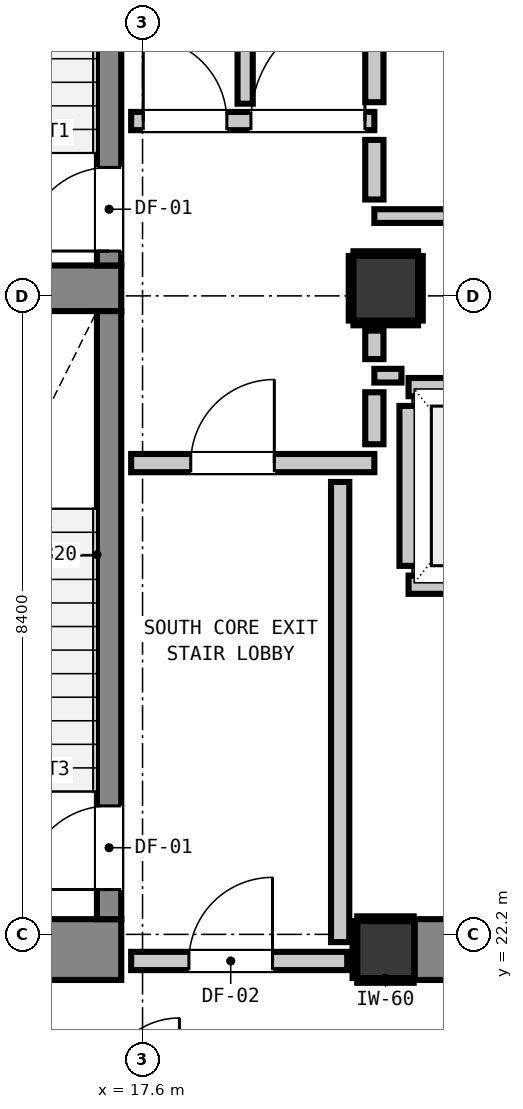
"""IFC4 building model, lengths in metres.
Left out: names, types, materials, properties, quantities, classifications, styles, units other than length and angle.
Written with IfcOpenShell. Run it as: python <this file> out.ifc"""

import sys

from ifc_helpers import new_model, si_unit, direction, frame, frame_2d, origin, origin_2d, place, context, subcontext, project, spatial, rectangle, extrude, element, fill, save


model = new_model("IFC4")
c1 = context("Model", 3, precision=1e-05, world=origin(), true_north=direction((0.0, 1.0)))
c2 = subcontext(c1, "Body", "Model", "MODEL_VIEW")
j1 = project(units=[si_unit("LENGTHUNIT", "METRE"), si_unit("PLANEANGLEUNIT", "RADIAN")], contexts=[c1])
p1 = place(None, origin())
s1 = spatial("IfcSite", under=j1, at=p1, CompositionType="ELEMENT")
p2 = place(p1, origin())
s2 = spatial("IfcBuilding", under=s1, at=p2, CompositionType="ELEMENT")
p3 = place(p2, frame((0.0, 0.0, 257.84)))
s3 = spatial("IfcBuildingStorey", under=s2, at=p3, CompositionType="ELEMENT", Elevation=257.84)
p4 = place(p3, frame((20.8, 22.0, 0.0), z_axis=(0.0, 0.0, 1.0), x_axis=(1.0, 0.0, 0.0)))
e1 = element("IfcColumn", 1, at=p4, inside=s3, PredefinedType="COLUMN", context=c2, shape_type="SweptSolid", body=[
    extrude(rectangle(XDim=0.75, YDim=0.75, at=origin_2d()), origin(), (0.0, 0.0, 1.0), 4.4),
])
p5 = place(p3, frame((13.24, 22.0, 0.0), z_axis=(0.0, 0.0, 1.0), x_axis=(1.0, 0.0, 0.0)))
e2 = element("IfcWall", 2, at=p5, inside=s3, PredefinedType="SHEAR", context=c2, shape_type="SweptSolid", body=[
    extrude(rectangle(XDim=4.08, YDim=0.8, at=frame_2d((2.04, 0.0))), origin(), (0.0, 0.0, 1.0), 4.4),
])
p6 = place(p3, frame((13.78, 30.7, 0.0), z_axis=(0.0, 0.0, 1.0), x_axis=(1.0, 0.0, 0.0)))
e3 = element("IfcWall", 3, at=p6, inside=s3, PredefinedType="SHEAR", context=c2, shape_type="SweptSolid", body=[
    extrude(rectangle(XDim=3.54, YDim=0.6, at=frame_2d((1.77, 0.0))), origin(), (0.0, 0.0, 1.0), 4.4),
])
p7 = place(p3, frame((21.18, 22.0, 0.0), z_axis=(0.0, 0.0, 1.0), x_axis=(1.0, 0.0, 0.0)))
e4 = element("IfcWall", 4, at=p7, inside=s3, PredefinedType="SHEAR", context=c2, shape_type="SweptSolid", body=[
    extrude(rectangle(XDim=7.64, YDim=0.8, at=frame_2d((3.82, 0.0))), origin(), (0.0, 0.0, 1.0), 4.4),
])
p8 = place(p3, frame((17.16, 31.0, 0.0), z_axis=(0.0, 0.0, 1.0), x_axis=(0.0, 1.0, 0.0)))
e5 = element("IfcWall", 5, at=p8, inside=s3, PredefinedType="SHEAR", context=c2, shape_type="SweptSolid", body=[
    extrude(rectangle(XDim=7.8, YDim=0.32, at=frame_2d((3.9, 0.0))), origin(), (0.0, 0.0, 1.0), 4.4),
])
p9 = place(p8, frame((0.19, 0.0, 0.0)))
e6 = element("IfcOpeningElement", 6, at=p9, cuts=e5, PredefinedType="OPENING", context=c2, shape_type="SweptSolid", body=[
    extrude(rectangle(XDim=1.1, YDim=2.15, at=frame_2d((0.55, 1.075))), frame((0.0, 0.17, 0.0), z_axis=(0.0, -1.0, 0.0), x_axis=(1.0, 0.0, 0.0)), (0.0, 0.0, 1.0), 0.34),
])
p10 = place(p3, frame((17.16, 22.4, 0.0), z_axis=(0.0, 0.0, 1.0), x_axis=(0.0, 1.0, 0.0)))
e7 = element("IfcWall", 7, at=p10, inside=s3, PredefinedType="SHEAR", context=c2, shape_type="SweptSolid", body=[
    extrude(rectangle(XDim=8.0, YDim=0.32, at=frame_2d((4.0, 0.0))), origin(), (0.0, 0.0, 1.0), 4.4),
])
p11 = place(p10, frame((0.39, 0.0, 0.0)))
e8 = element("IfcOpeningElement", 8, at=p11, cuts=e7, PredefinedType="OPENING", context=c2, shape_type="SweptSolid", body=[
    extrude(rectangle(XDim=1.1, YDim=2.15, at=frame_2d((0.55, 1.075))), frame((0.0, 0.17, 0.0), z_axis=(0.0, -1.0, 0.0), x_axis=(1.0, 0.0, 0.0)), (0.0, 0.0, 1.0), 0.34),
])
p12 = place(p3, frame((20.8, 30.7, 0.0), z_axis=(0.0, 0.0, 1.0), x_axis=(1.0, 0.0, 0.0)))
e9 = element("IfcColumn", 9, at=p12, inside=s3, PredefinedType="COLUMN", context=c2, shape_type="SweptSolid", body=[
    extrude(rectangle(XDim=0.85, YDim=0.85, at=origin_2d()), origin(), (0.0, 0.0, 1.0), 4.4),
])
for number, where, z_axis, x_axis in (
    (10, (21.1, 26.8, 0.0), (0.0, 0.0, 1.0), (1.0, 0.0, 0.0)),
    (11, (21.1, 29.4, 0.0), (0.0, 0.0, 1.0), (1.0, 0.0, 0.0)),
):
    element("IfcWall", number, at=place(p3, frame(where, z_axis=z_axis, x_axis=x_axis)), inside=s3, PredefinedType="PARTITIONING", context=c2, shape_type="SweptSolid", body=[
        extrude(rectangle(XDim=2.2, YDim=0.24, at=frame_2d((1.1, 0.0))), origin(), (0.0, 0.0, 1.0), 4.18),
    ])
p13 = place(p3, frame((21.1, 27.048, 0.0), z_axis=(0.0, 0.0, 1.0), x_axis=(0.0, 1.0, 0.0)))
e12 = element("IfcWall", 12, at=p13, inside=s3, PredefinedType="PARTITIONING", context=c2, shape_type="SweptSolid", body=[
    extrude(rectangle(XDim=2.104, YDim=0.24, at=frame_2d((1.052, 0.0))), origin(), (0.0, 0.0, 1.0), 3.415),
])
p14 = place(p3, frame((17.45, 21.85, 0.0), z_axis=(0.0, 0.0, 1.0), x_axis=(1.0, 0.0, 0.0)))
e13 = element("IfcWall", 13, at=p14, inside=s3, PredefinedType="PARTITIONING", context=c2, shape_type="SweptSolid", body=[
    extrude(rectangle(XDim=2.843, YDim=0.24, at=frame_2d((1.421, 0.0))), origin(), (0.0, 0.0, 1.0), 3.807),
])
p15 = place(p14, frame((0.76, 0.0, 0.0)))
e14 = element("IfcOpeningElement", 14, at=p15, cuts=e13, PredefinedType="OPENING", context=c2, shape_type="SweptSolid", body=[
    extrude(rectangle(XDim=1.1, YDim=2.15, at=frame_2d((0.55, 1.075))), frame((0.0, 0.13, 0.0), z_axis=(0.0, -1.0, 0.0), x_axis=(1.0, 0.0, 0.0)), (0.0, 0.0, 1.0), 0.26),
])
p16 = place(p3, frame((17.45, 28.4, 0.0), z_axis=(0.0, 0.0, 1.0), x_axis=(1.0, 0.0, 0.0)))
e15 = element("IfcWall", 15, at=p16, inside=s3, PredefinedType="PARTITIONING", context=c2, shape_type="SweptSolid", body=[
    extrude(rectangle(XDim=3.2, YDim=0.24, at=frame_2d((1.6, 0.0))), origin(), (0.0, 0.0, 1.0), 4.18),
])
p17 = place(p16, frame((0.784, 0.0, 0.0)))
e16 = element("IfcOpeningElement", 16, at=p17, cuts=e15, PredefinedType="OPENING", context=c2, shape_type="SweptSolid", body=[
    extrude(rectangle(XDim=1.1, YDim=2.15, at=frame_2d((0.55, 1.075))), frame((0.0, 0.13, 0.0), z_axis=(0.0, -1.0, 0.0), x_axis=(1.0, 0.0, 0.0)), (0.0, 0.0, 1.0), 0.26),
])
p18 = place(p3, frame((17.45, 32.9, 0.0), z_axis=(0.0, 0.0, 1.0), x_axis=(1.0, 0.0, 0.0)))
e17 = element("IfcWall", 17, at=p18, inside=s3, PredefinedType="PARTITIONING", context=c2, shape_type="SweptSolid", body=[
    extrude(rectangle(XDim=3.2, YDim=0.24, at=frame_2d((1.6, 0.0))), origin(), (0.0, 0.0, 1.0), 4.18),
])
p19 = place(p18, frame((0.159, 0.0, 0.0)))
e18 = element("IfcOpeningElement", 18, at=p19, cuts=e17, PredefinedType="OPENING", context=c2, shape_type="SweptSolid", body=[
    extrude(rectangle(XDim=1.1, YDim=2.15, at=frame_2d((0.55, 1.075))), frame((0.0, 0.13, 0.0), z_axis=(0.0, -1.0, 0.0), x_axis=(1.0, 0.0, 0.0)), (0.0, 0.0, 1.0), 0.26),
])
p20 = place(p18, frame((1.576, 0.0, 0.0)))
e19 = element("IfcOpeningElement", 19, at=p20, cuts=e17, PredefinedType="OPENING", context=c2, shape_type="SweptSolid", body=[
    extrude(rectangle(XDim=1.5, YDim=2.15, at=frame_2d((0.75, 1.075))), frame((0.0, 0.13, 0.0), z_axis=(0.0, -1.0, 0.0), x_axis=(1.0, 0.0, 0.0)), (0.0, 0.0, 1.0), 0.26),
])
p21 = place(p3, frame((20.65, 29.55, 0.0), z_axis=(0.0, 0.0, 1.0), x_axis=(1.0, 0.0, 0.0)))
e20 = element("IfcWall", 20, at=p21, inside=s3, PredefinedType="PARTITIONING", context=c2, shape_type="SweptSolid", body=[
    extrude(rectangle(XDim=0.357, YDim=0.18, at=frame_2d((0.179, 0.0))), origin(), (0.0, 0.0, 1.0), 4.18),
])
p22 = place(p3, frame((20.65, 31.65, 0.0), z_axis=(0.0, 0.0, 1.0), x_axis=(1.0, 0.0, 0.0)))
e21 = element("IfcWall", 21, at=p22, inside=s3, PredefinedType="PARTITIONING", context=c2, shape_type="SweptSolid", body=[
    extrude(rectangle(XDim=7.7, YDim=0.18, at=frame_2d((3.85, 0.0))), origin(), (0.0, 0.0, 1.0), 4.18),
])
p23 = place(p22, frame((4.673, 0.0, 0.0)))
e22 = element("IfcOpeningElement", 22, at=p23, cuts=e21, PredefinedType="OPENING", context=c2, shape_type="SweptSolid", body=[
    extrude(rectangle(XDim=0.9, YDim=2.1, at=frame_2d((0.45, 1.05))), frame((0.0, 0.1, 0.0), z_axis=(0.0, -1.0, 0.0), x_axis=(1.0, 0.0, 0.0)), (0.0, 0.0, 1.0), 0.2),
])
p24 = place(p3, frame((20.2, 22.098, 0.0), z_axis=(0.0, 0.0, 1.0), x_axis=(0.0, 1.0, 0.0)))
e23 = element("IfcWall", 23, at=p24, inside=s3, PredefinedType="PARTITIONING", context=c2, shape_type="SweptSolid", body=[
    extrude(rectangle(XDim=6.054, YDim=0.24, at=frame_2d((3.027, 0.0))), origin(), (0.0, 0.0, 1.0), 4.18),
])
p25 = place(p3, frame((20.65, 28.648, 0.0), z_axis=(0.0, 0.0, 1.0), x_axis=(0.0, 1.0, 0.0)))
e24 = element("IfcWall", 24, at=p25, inside=s3, PredefinedType="PARTITIONING", context=c2, shape_type="SweptSolid", body=[
    extrude(rectangle(XDim=0.684, YDim=0.24, at=frame_2d((0.342, 0.0))), origin(), (0.0, 0.0, 1.0), 3.415),
])
p26 = place(p3, frame((20.65, 29.768, 0.0), z_axis=(0.0, 0.0, 1.0), x_axis=(0.0, 1.0, 0.0)))
e25 = element("IfcWall", 25, at=p26, inside=s3, PredefinedType="PARTITIONING", context=c2, shape_type="SweptSolid", body=[
    extrude(rectangle(XDim=0.375, YDim=0.24, at=frame_2d((0.188, 0.0))), origin(), (0.0, 0.0, 1.0), 3.415),
])
p27 = place(p3, frame((20.65, 31.868, 0.0), z_axis=(0.0, 0.0, 1.0), x_axis=(0.0, 1.0, 0.0)))
e26 = element("IfcWall", 26, at=p27, inside=s3, PredefinedType="PARTITIONING", context=c2, shape_type="SweptSolid", body=[
    extrude(rectangle(XDim=0.784, YDim=0.24, at=frame_2d((0.392, 0.0))), origin(), (0.0, 0.0, 1.0), 3.415),
])
p28 = place(p3, frame((20.65, 33.148, 0.0), z_axis=(0.0, 0.0, 1.0), x_axis=(0.0, 1.0, 0.0)))
e27 = element("IfcWall", 27, at=p28, inside=s3, PredefinedType="PARTITIONING", context=c2, shape_type="SweptSolid", body=[
    extrude(rectangle(XDim=2.274, YDim=0.24, at=frame_2d((1.137, 0.0))), origin(), (0.0, 0.0, 1.0), 3.415),
])
p29 = place(p3, frame((18.95, 33.128, 0.0), z_axis=(0.0, 0.0, 1.0), x_axis=(0.0, 1.0, 0.0)))
e28 = element("IfcWall", 28, at=p29, inside=s3, PredefinedType="PARTITIONING", context=c2, shape_type="SweptSolid", body=[
    extrude(rectangle(XDim=2.314, YDim=0.2, at=frame_2d((1.157, 0.0))), origin(), (0.0, 0.0, 1.0), 4.18),
])
for number, where, z_axis, x_axis in (
    (29, (20.425, 21.593, 0.0), (0.0, 0.0, 1.0), (1.0, 0.0, 0.0)),
    (30, (20.425, 22.407, 0.0), (0.0, 0.0, 1.0), (1.0, 0.0, 0.0)),
):
    element("IfcWall", number, at=place(p3, frame(where, z_axis=z_axis, x_axis=x_axis)), inside=s3, PredefinedType="PARTITIONING", context=c2, shape_type="SweptSolid", body=[
        extrude(rectangle(XDim=0.742, YDim=0.06, at=frame_2d((0.371, 0.0))), origin(), (0.0, 0.0, 1.0), 1.45),
    ])
p30 = place(p3, frame((20.393, 21.625, 0.0), z_axis=(0.0, 0.0, 1.0), x_axis=(0.0, 1.0, 0.0)))
e31 = element("IfcWall", 31, at=p30, inside=s3, PredefinedType="PARTITIONING", context=c2, shape_type="SweptSolid", body=[
    extrude(rectangle(XDim=0.75, YDim=0.06, at=frame_2d((0.375, 0.0))), origin(), (0.0, 0.0, 1.0), 1.45),
])
for number, where, z_axis, x_axis in (
    (32, (20.375, 30.243, 0.0), (0.0, 0.0, 1.0), (1.0, 0.0, 0.0)),
    (33, (20.375, 31.157, 0.0), (0.0, 0.0, 1.0), (1.0, 0.0, 0.0)),
    (34, (20.343, 30.275, 0.0), (0.0, 0.0, 1.0), (0.0, 1.0, 0.0)),
    (35, (21.257, 30.275, 0.0), (0.0, 0.0, 1.0), (0.0, 1.0, 0.0)),
):
    element("IfcWall", number, at=place(p3, frame(where, z_axis=z_axis, x_axis=x_axis)), inside=s3, PredefinedType="PARTITIONING", context=c2, shape_type="SweptSolid", body=[
        extrude(rectangle(XDim=0.85, YDim=0.06, at=frame_2d((0.425, 0.0))), origin(), (0.0, 0.0, 1.0), 1.45),
    ])
p31 = place(p9, origin())
e36 = element("IfcDoor", 36, at=p31, inside=s3, OperationType="SINGLE_SWING_LEFT", PredefinedType="DOOR", context=c2, shape_type="SweptSolid", body=[
    extrude(rectangle(XDim=1.1, YDim=2.15, at=frame_2d((0.55, 1.075))), frame((0.0, 0.025, 0.0), z_axis=(0.0, -1.0, 0.0), x_axis=(1.0, 0.0, 0.0)), (0.0, 0.0, 1.0), 0.05),
])
fill(e6, e36)
p32 = place(p11, origin())
e37 = element("IfcDoor", 37, at=p32, inside=s3, OperationType="SINGLE_SWING_LEFT", PredefinedType="DOOR", context=c2, shape_type="SweptSolid", body=[
    extrude(rectangle(XDim=1.1, YDim=2.15, at=frame_2d((0.55, 1.075))), frame((0.0, 0.025, 0.0), z_axis=(0.0, -1.0, 0.0), x_axis=(1.0, 0.0, 0.0)), (0.0, 0.0, 1.0), 0.05),
])
fill(e8, e37)
p33 = place(p17, origin())
e38 = element("IfcDoor", 38, at=p33, inside=s3, OperationType="SINGLE_SWING_RIGHT", PredefinedType="DOOR", context=c2, shape_type="SweptSolid", body=[
    extrude(rectangle(XDim=1.1, YDim=2.15, at=frame_2d((0.55, 1.075))), frame((0.0, 0.025, 0.0), z_axis=(0.0, -1.0, 0.0), x_axis=(1.0, 0.0, 0.0)), (0.0, 0.0, 1.0), 0.05),
])
fill(e16, e38)
p34 = place(p19, origin())
e39 = element("IfcDoor", 39, at=p34, inside=s3, OperationType="SINGLE_SWING_LEFT", PredefinedType="DOOR", context=c2, shape_type="SweptSolid", body=[
    extrude(rectangle(XDim=1.1, YDim=2.15, at=frame_2d((0.55, 1.075))), frame((0.0, 0.025, 0.0), z_axis=(0.0, -1.0, 0.0), x_axis=(1.0, 0.0, 0.0)), (0.0, 0.0, 1.0), 0.05),
])
fill(e18, e39)
p35 = place(p15, origin())
e40 = element("IfcDoor", 40, at=p35, inside=s3, OperationType="SINGLE_SWING_RIGHT", PredefinedType="DOOR", context=c2, shape_type="SweptSolid", body=[
    extrude(rectangle(XDim=1.1, YDim=2.15, at=frame_2d((0.55, 1.075))), frame((0.0, 0.025, 0.0), z_axis=(0.0, -1.0, 0.0), x_axis=(1.0, 0.0, 0.0)), (0.0, 0.0, 1.0), 0.05),
])
fill(e14, e40)
p36 = place(p20, origin())
e41 = element("IfcDoor", 41, at=p36, inside=s3, OperationType="SINGLE_SWING_RIGHT", PredefinedType="DOOR", context=c2, shape_type="SweptSolid", body=[
    extrude(rectangle(XDim=1.5, YDim=2.15, at=frame_2d((0.75, 1.075))), frame((0.0, 0.025, 0.0), z_axis=(0.0, -1.0, 0.0), x_axis=(1.0, 0.0, 0.0)), (0.0, 0.0, 1.0), 0.05),
])
fill(e19, e41)
save(model, sys.argv[1])
